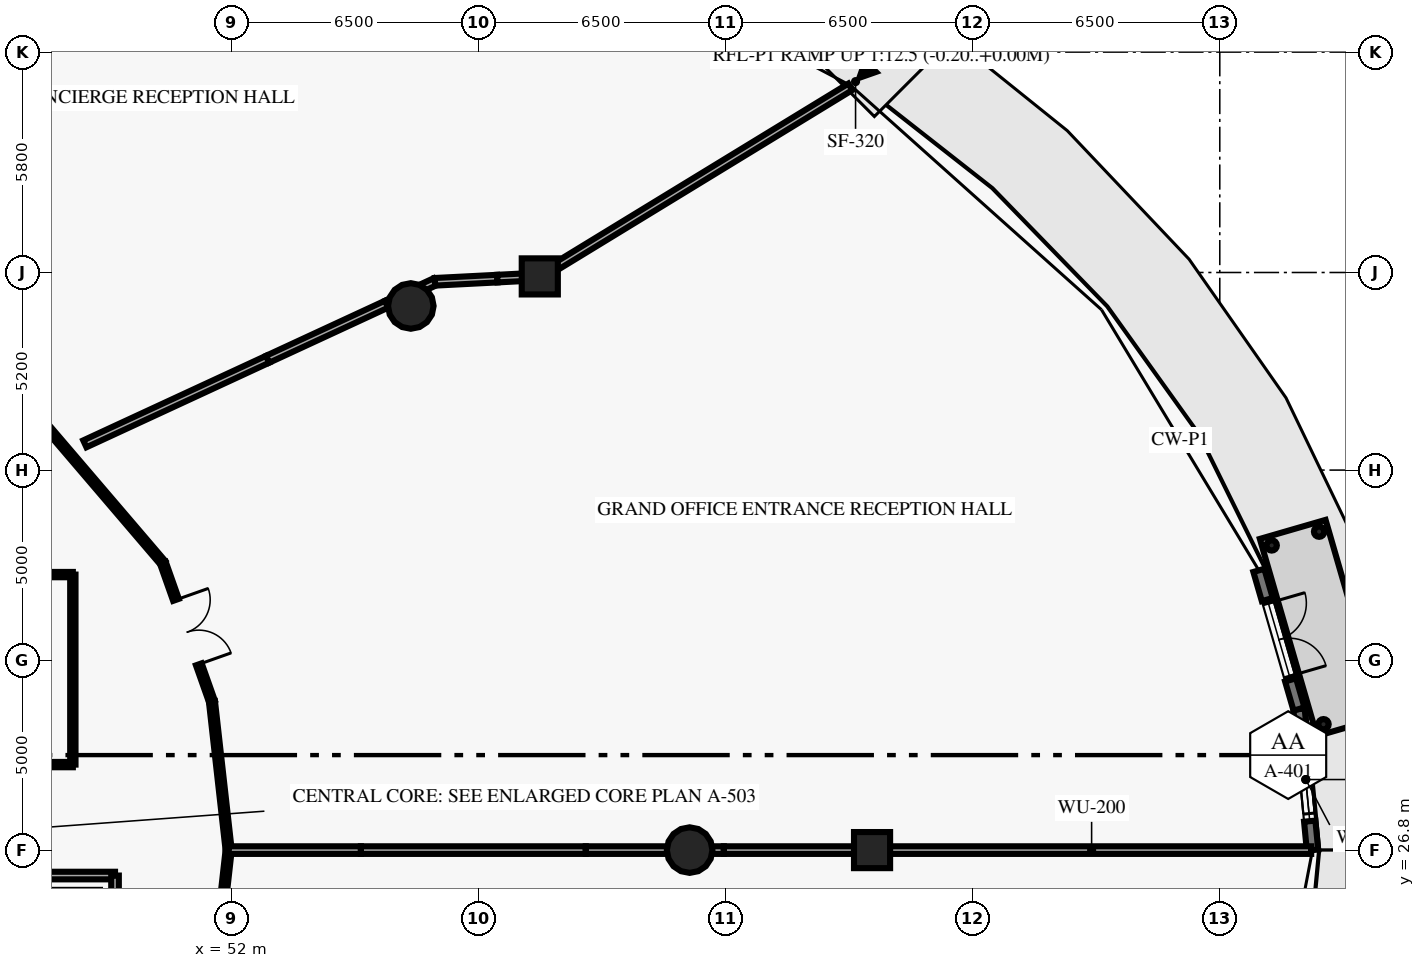
"""IFC4 building model, lengths in metres.
Left out: names, types, materials, properties, quantities, classifications, styles, units other than length and angle.
Written with IfcOpenShell. Run it as: python <this file> out.ifc"""

import sys

from ifc_helpers import new_model, si_unit, direction, frame, frame_2d, origin, origin_2d, place, context, subcontext, project, spatial, rectangle, circle, hollow_circle, extrude, element, fill, save


model = new_model("IFC4")
c1 = context("Model", 3, precision=1e-05, world=origin(), true_north=direction((0.0, 1.0)))
c2 = subcontext(c1, "Body", "Model", "MODEL_VIEW")
j1 = project(units=[si_unit("LENGTHUNIT", "METRE"), si_unit("PLANEANGLEUNIT", "RADIAN")], contexts=[c1])
p1 = place(None, origin())
s1 = spatial("IfcSite", under=j1, at=p1, CompositionType="ELEMENT")
p2 = place(p1, origin())
s2 = spatial("IfcBuilding", under=s1, at=p2, CompositionType="ELEMENT")
p3 = place(p2, origin())
s3 = spatial("IfcBuildingStorey", under=s2, at=p3, CompositionType="ELEMENT", Elevation=0.0)
for number, where, z_axis, x_axis in (
    (1, (64.05, 26.8, 0.0), (0.0, 0.0, 1.0), (1.0, 0.0, 0.0)),
    (2, (56.713, 41.119, 0.0), (0.0, 0.0, 1.0), (1.0, 0.0, 0.0)),
):
    element("IfcColumn", number, at=place(p3, frame(where, z_axis=z_axis, x_axis=x_axis)), inside=s3, PredefinedType="COLUMN", context=c2, shape_type="SweptSolid", body=[
        extrude(circle(Radius=0.6, at=origin_2d()), origin(), (0.0, 0.0, 1.0), 5.7),
    ])
for number, where, z_axis, x_axis in (
    (3, (68.85, 26.8, 0.0), (0.0, 0.0, 1.0), (1.0, 0.0, 0.0)),
    (4, (60.107, 41.897, 0.0), (0.0, 0.0, 1.0), (1.0, 0.0, 0.0)),
):
    element("IfcColumn", number, at=place(p3, frame(where, z_axis=z_axis, x_axis=x_axis)), inside=s3, PredefinedType="COLUMN", context=c2, shape_type="SweptSolid", body=[
        extrude(rectangle(XDim=0.95, YDim=0.95, at=origin_2d()), origin(), (0.0, 0.0, 1.0), 5.7),
    ])
p4 = place(p3, frame((80.085, 30.512, 0.0), z_axis=(0.0, 0.0, 1.0), x_axis=(0.09519839492, -0.995458319371, 0.0)))
e5 = element("IfcWall", 5, at=p4, inside=s3, PredefinedType="STANDARD", context=c2, shape_type="SweptSolid", body=[
    extrude(rectangle(XDim=3.729, YDim=0.3, at=frame_2d((1.864, 0.0))), origin(), (0.0, 0.0, 1.0), 5.7),
])
p5 = place(p4, frame((0.964, 0.0, 0.9)))
e6 = element("IfcOpeningElement", 6, at=p5, cuts=e5, PredefinedType="OPENING", context=c2, shape_type="SweptSolid", body=[
    extrude(rectangle(XDim=1.8, YDim=2.4, at=frame_2d((0.9, 1.2))), frame((0.0, 0.16, 0.0), z_axis=(0.0, -1.0, 0.0), x_axis=(1.0, 0.0, 0.0)), (0.0, 0.0, 1.0), 0.32),
])
p6 = place(p4, frame((0.764, 0.0, 3.4)))
e7 = element("IfcOpeningElement", 7, at=p6, cuts=e5, PredefinedType="OPENING", context=c2, shape_type="SweptSolid", body=[
    extrude(rectangle(XDim=2.2, YDim=1.3, at=frame_2d((1.1, 0.65))), frame((0.0, 0.16, 0.0), z_axis=(0.0, -1.0, 0.0), x_axis=(1.0, 0.0, 0.0)), (0.0, 0.0, 1.0), 0.32),
])
p7 = place(p3, frame((79.028, 34.161, 0.0), z_axis=(0.0, 0.0, 1.0), x_axis=(0.278207876785, -0.960520888526, 0.0)))
e8 = element("IfcWall", 8, at=p7, inside=s3, PredefinedType="STANDARD", context=c2, shape_type="SweptSolid", body=[
    extrude(rectangle(XDim=3.799, YDim=0.3, at=frame_2d((1.899, 0.0))), origin(), (0.0, 0.0, 1.0), 5.7),
])
p8 = place(p7, frame((0.9, 0.0, 0.0)))
e9 = element("IfcOpeningElement", 9, at=p8, cuts=e8, PredefinedType="OPENING", context=c2, shape_type="SweptSolid", body=[
    extrude(rectangle(XDim=2.0, YDim=2.4, at=frame_2d((1.0, 1.2))), frame((0.0, 0.16, 0.0), z_axis=(0.0, -1.0, 0.0), x_axis=(1.0, 0.0, 0.0)), (0.0, 0.0, 1.0), 0.32),
])
p9 = place(p7, frame((0.8, 0.0, 3.4)))
e10 = element("IfcOpeningElement", 10, at=p9, cuts=e8, PredefinedType="OPENING", context=c2, shape_type="SweptSolid", body=[
    extrude(rectangle(XDim=2.2, YDim=1.3, at=frame_2d((1.1, 0.65))), frame((0.0, 0.16, 0.0), z_axis=(0.0, -1.0, 0.0), x_axis=(1.0, 0.0, 0.0)), (0.0, 0.0, 1.0), 0.32),
])
for number, where, z_axis, x_axis in (
    (11, (80.729, 30.112, -0.22), (0.0, 0.0, 1.0), (1.0, 0.0, 0.0)),
    (12, (79.365, 34.818, -0.22), (0.0, 0.0, 1.0), (1.0, 0.0, 0.0)),
    (13, (80.614, 35.18, -0.22), (0.0, 0.0, 1.0), (1.0, 0.0, 0.0)),
):
    element("IfcColumn", number, at=place(p3, frame(where, z_axis=z_axis, x_axis=x_axis)), inside=s3, PredefinedType="COLUMN", context=c2, shape_type="SweptSolid", body=[
        extrude(hollow_circle(Radius=0.136, WallThickness=0.013, at=origin_2d()), origin(), (0.0, 0.0, 1.0), 3.47),
    ])
p10 = place(p3, frame((46.62, 26.13, 0.0), z_axis=(0.0, 0.0, 1.0), x_axis=(1.0, 0.0, 0.0)))
e14 = element("IfcWall", 14, at=p10, inside=s3, PredefinedType="SOLIDWALL", context=c2, shape_type="SweptSolid", body=[
    extrude(rectangle(XDim=2.31, YDim=0.2, at=frame_2d((1.155, 0.0))), origin(), (0.0, 0.0, 1.0), 5.7),
])
p11 = place(p3, frame((48.93, 23.72, 0.0), z_axis=(0.0, 0.0, 1.0), x_axis=(0.0, 1.0, 0.0)))
e15 = element("IfcWall", 15, at=p11, inside=s3, PredefinedType="SOLIDWALL", context=c2, shape_type="SweptSolid", body=[
    extrude(rectangle(XDim=2.41, YDim=0.2, at=frame_2d((1.205, 0.0))), origin(), (0.0, 0.0, 1.0), 5.7),
])
p12 = place(p3, frame((46.77, 29.05, 0.0), z_axis=(0.0, 0.0, 1.0), x_axis=(1.0, 0.0, 0.0)))
e16 = element("IfcWall", 16, at=p12, inside=s3, PredefinedType="PARTITIONING", context=c2, shape_type="SweptSolid", body=[
    extrude(rectangle(XDim=1.05, YDim=0.14, at=frame_2d((0.525, 0.0))), origin(), (0.0, 0.0, 1.0), 5.7),
])
p13 = place(p3, frame((46.18, 34.05, 0.0), z_axis=(0.0, 0.0, 1.0), x_axis=(1.0, 0.0, 0.0)))
e17 = element("IfcWall", 17, at=p13, inside=s3, PredefinedType="PARTITIONING", context=c2, shape_type="SweptSolid", body=[
    extrude(rectangle(XDim=1.64, YDim=0.14, at=frame_2d((0.82, 0.0))), origin(), (0.0, 0.0, 1.0), 5.7),
])
p14 = place(p3, frame((47.82, 29.05, 0.0), z_axis=(0.0, 0.0, 1.0), x_axis=(0.0, 1.0, 0.0)))
e18 = element("IfcWall", 18, at=p14, inside=s3, PredefinedType="PARTITIONING", context=c2, shape_type="SweptSolid", body=[
    extrude(rectangle(XDim=5.0, YDim=0.14, at=frame_2d((2.5, 0.0))), origin(), (0.0, 0.0, 1.0), 5.7),
])
p15 = place(p3, frame((51.92, 26.8, 0.0), z_axis=(0.0, 0.0, 1.0), x_axis=(-0.111731247657, 0.993738460711, 0.0)))
e19 = element("IfcWall", 19, at=p15, inside=s3, PredefinedType="PARTITIONING", context=c2, shape_type="SweptSolid", body=[
    extrude(rectangle(XDim=3.938, YDim=0.16, at=frame_2d((1.969, 0.0))), origin(), (0.0, 0.0, 1.0), 5.7),
])
p16 = place(p3, frame((50.189, 34.36, 0.0), z_axis=(0.0, 0.0, 1.0), x_axis=(0.333684770033, -0.942684716248, 0.0)))
e20 = element("IfcWall", 20, at=p16, inside=s3, PredefinedType="PARTITIONING", context=c2, shape_type="SweptSolid", body=[
    extrude(rectangle(XDim=3.869, YDim=0.16, at=frame_2d((1.935, 0.0))), origin(), (0.0, 0.0, 1.0), 5.7),
])
p17 = place(p16, frame((1.034, 0.0, 0.0)))
e21 = element("IfcOpeningElement", 21, at=p17, cuts=e20, PredefinedType="OPENING", context=c2, shape_type="SweptSolid", body=[
    extrude(rectangle(XDim=1.8, YDim=2.3, at=frame_2d((0.9, 1.15))), frame((0.0, 0.09, 0.0), z_axis=(0.0, -1.0, 0.0), x_axis=(1.0, 0.0, 0.0)), (0.0, 0.0, 1.0), 0.18),
])
p18 = place(p3, frame((50.189, 34.36, 0.0), z_axis=(0.0, 0.0, 1.0), x_axis=(-0.649652680018, 0.760231145998, 0.0)))
e22 = element("IfcWall", 22, at=p18, inside=s3, PredefinedType="PARTITIONING", context=c2, shape_type="SweptSolid", body=[
    extrude(rectangle(XDim=7.279, YDim=0.16, at=frame_2d((3.64, 0.0))), origin(), (0.0, 0.0, 1.0), 5.7),
])
p19 = place(p3, frame((51.92, 26.8, 0.0), z_axis=(0.0, 0.0, 1.0), x_axis=(-0.111724363671, -0.99373923469, 0.0)))
e23 = element("IfcWall", 23, at=p19, inside=s3, PredefinedType="PARTITIONING", context=c2, shape_type="SweptSolid", body=[
    extrude(rectangle(XDim=3.938, YDim=0.16, at=frame_2d((1.969, 0.0))), origin(), (0.0, 0.0, 1.0), 5.7),
])
p20 = place(p19, frame((1.069, 0.0, 0.0)))
e24 = element("IfcOpeningElement", 24, at=p20, cuts=e23, PredefinedType="OPENING", context=c2, shape_type="SweptSolid", body=[
    extrude(rectangle(XDim=1.8, YDim=2.3, at=frame_2d((0.9, 1.15))), frame((0.0, 0.09, 0.0), z_axis=(0.0, -1.0, 0.0), x_axis=(1.0, 0.0, 0.0)), (0.0, 0.0, 1.0), 0.18),
])
p21 = place(p3, frame((51.92, 26.8, 0.0), z_axis=(0.0, 0.0, 1.0), x_axis=(1.0, 0.0, 0.0)))
e25 = element("IfcWall", 25, at=p21, inside=s3, PredefinedType="PARTITIONING", context=c2, shape_type="SweptSolid", body=[
    extrude(rectangle(XDim=3.48, YDim=0.2, at=frame_2d((1.74, 0.0))), origin(), (0.0, 0.0, 1.0), 5.7),
])
p22 = place(p3, frame((55.4, 26.8, 0.0), z_axis=(0.0, 0.0, 1.0), x_axis=(1.0, 0.0, 0.0)))
e26 = element("IfcWall", 26, at=p22, inside=s3, PredefinedType="PARTITIONING", context=c2, shape_type="SweptSolid", body=[
    extrude(rectangle(XDim=5.917, YDim=0.2, at=frame_2d((2.958, 0.0))), origin(), (0.0, 0.0, 1.0), 5.7),
])
p23 = place(p3, frame((61.317, 26.8, 0.0), z_axis=(0.0, 0.0, 1.0), x_axis=(1.0, 0.0, 0.0)))
e27 = element("IfcWall", 27, at=p23, inside=s3, PredefinedType="PARTITIONING", context=c2, shape_type="SweptSolid", body=[
    extrude(rectangle(XDim=3.633, YDim=0.2, at=frame_2d((1.816, 0.0))), origin(), (0.0, 0.0, 1.0), 4.66),
])
p24 = place(p3, frame((64.95, 26.8, 0.0), z_axis=(0.0, 0.0, 1.0), x_axis=(1.0, 0.0, 0.0)))
e28 = element("IfcWall", 28, at=p24, inside=s3, PredefinedType="PARTITIONING", context=c2, shape_type="SweptSolid", body=[
    extrude(rectangle(XDim=3.9, YDim=0.2, at=frame_2d((1.95, 0.0))), origin(), (0.0, 0.0, 1.0), 5.24),
])
p25 = place(p3, frame((68.85, 26.8, 0.0), z_axis=(0.0, 0.0, 1.0), x_axis=(1.0, 0.0, 0.0)))
e29 = element("IfcWall", 29, at=p25, inside=s3, PredefinedType="PARTITIONING", context=c2, shape_type="SweptSolid", body=[
    extrude(rectangle(XDim=11.555, YDim=0.2, at=frame_2d((5.777, 0.0))), origin(), (0.0, 0.0, 1.0), 5.7),
])
p26 = place(p3, frame((48.136, 37.491, 0.0), z_axis=(0.0, 0.0, 1.0), x_axis=(0.907524785669, 0.419998527851, 0.0)))
e30 = element("IfcWall", 30, at=p26, inside=s3, PredefinedType="PARTITIONING", context=c2, shape_type="SweptSolid", body=[
    extrude(rectangle(XDim=5.3, YDim=0.2, at=frame_2d((2.65, 0.0))), origin(), (0.0, 0.0, 1.0), 5.7),
])
p27 = place(p3, frame((52.946, 39.717, 0.0), z_axis=(0.0, 0.0, 1.0), x_axis=(0.90747190463, 0.420112773321, 0.0)))
e31 = element("IfcWall", 31, at=p27, inside=s3, PredefinedType="PARTITIONING", context=c2, shape_type="SweptSolid", body=[
    extrude(rectangle(XDim=3.449, YDim=0.2, at=frame_2d((1.725, 0.0))), origin(), (0.0, 0.0, 1.0), 4.92),
])
p28 = place(p3, frame((56.076, 41.166, 0.0), z_axis=(0.0, 0.0, 1.0), x_axis=(0.907622896373, 0.419786467124, 0.0)))
e32 = element("IfcWall", 32, at=p28, inside=s3, PredefinedType="PARTITIONING", context=c2, shape_type="SweptSolid", body=[
    extrude(rectangle(XDim=1.403, YDim=0.2, at=frame_2d((0.701, 0.0))), origin(), (0.0, 0.0, 1.0), 5.7),
])
p29 = place(p3, frame((57.349, 41.755, 0.0), z_axis=(0.0, 0.0, 1.0), x_axis=(0.998685128887, 0.051264152576, 0.0)))
e33 = element("IfcWall", 33, at=p29, inside=s3, PredefinedType="PARTITIONING", context=c2, shape_type="SweptSolid", body=[
    extrude(rectangle(XDim=1.643, YDim=0.2, at=frame_2d((0.822, 0.0))), origin(), (0.0, 0.0, 1.0), 5.7),
])
p30 = place(p3, frame((58.99, 41.839, 0.0), z_axis=(0.0, 0.0, 1.0), x_axis=(0.998660904733, 0.051733909163, 0.0)))
e34 = element("IfcWall", 34, at=p30, inside=s3, PredefinedType="PARTITIONING", context=c2, shape_type="SweptSolid", body=[
    extrude(rectangle(XDim=1.118, YDim=0.2, at=frame_2d((0.559, 0.0))), origin(), (0.0, 0.0, 1.0), 5.24),
])
p31 = place(p3, frame((60.107, 41.897, 0.0), z_axis=(0.0, 0.0, 1.0), x_axis=(0.853534520774, 0.521036296093, 0.0)))
e35 = element("IfcWall", 35, at=p31, inside=s3, PredefinedType="PARTITIONING", context=c2, shape_type="SweptSolid", body=[
    extrude(rectangle(XDim=9.573, YDim=0.2, at=frame_2d((4.787, 0.0))), origin(), (0.0, 0.0, 1.0), 5.7),
])
p32 = place(p5, origin())
e36 = element("IfcWindow", 36, at=p32, inside=s3, PartitioningType="DOUBLE_PANEL_VERTICAL", PredefinedType="WINDOW", context=c2, shape_type="SweptSolid", body=[
    extrude(rectangle(XDim=1.8, YDim=2.4, at=frame_2d((0.9, 1.2))), frame((0.0, 0.03, 0.0), z_axis=(0.0, -1.0, 0.0), x_axis=(1.0, 0.0, 0.0)), (0.0, 0.0, 1.0), 0.06),
])
fill(e6, e36)
p33 = place(p6, origin())
e37 = element("IfcWindow", 37, at=p33, inside=s3, PartitioningType="DOUBLE_PANEL_HORIZONTAL", PredefinedType="WINDOW", context=c2, shape_type="SweptSolid", body=[
    extrude(rectangle(XDim=2.2, YDim=1.3, at=frame_2d((1.1, 0.65))), frame((0.0, 0.03, 0.0), z_axis=(0.0, -1.0, 0.0), x_axis=(1.0, 0.0, 0.0)), (0.0, 0.0, 1.0), 0.06),
])
fill(e7, e37)
p34 = place(p8, origin())
e38 = element("IfcDoor", 38, at=p34, inside=s3, OperationType="DOUBLE_DOOR_SINGLE_SWING", PredefinedType="DOOR", context=c2, shape_type="SweptSolid", body=[
    extrude(rectangle(XDim=2.0, YDim=2.4, at=frame_2d((1.0, 1.2))), frame((0.0, 0.025, 0.0), z_axis=(0.0, -1.0, 0.0), x_axis=(1.0, 0.0, 0.0)), (0.0, 0.0, 1.0), 0.05),
])
fill(e9, e38)
p35 = place(p9, origin())
e39 = element("IfcWindow", 39, at=p35, inside=s3, PartitioningType="DOUBLE_PANEL_HORIZONTAL", PredefinedType="WINDOW", context=c2, shape_type="SweptSolid", body=[
    extrude(rectangle(XDim=2.2, YDim=1.3, at=frame_2d((1.1, 0.65))), frame((0.0, 0.03, 0.0), z_axis=(0.0, -1.0, 0.0), x_axis=(1.0, 0.0, 0.0)), (0.0, 0.0, 1.0), 0.06),
])
fill(e10, e39)
p36 = place(p17, origin())
e40 = element("IfcDoor", 40, at=p36, inside=s3, OperationType="DOUBLE_DOOR_SINGLE_SWING", PredefinedType="DOOR", context=c2, shape_type="SweptSolid", body=[
    extrude(rectangle(XDim=1.8, YDim=2.3, at=frame_2d((0.9, 1.15))), frame((0.0, 0.025, 0.0), z_axis=(0.0, -1.0, 0.0), x_axis=(1.0, 0.0, 0.0)), (0.0, 0.0, 1.0), 0.05),
])
fill(e21, e40)
save(model, sys.argv[1])
